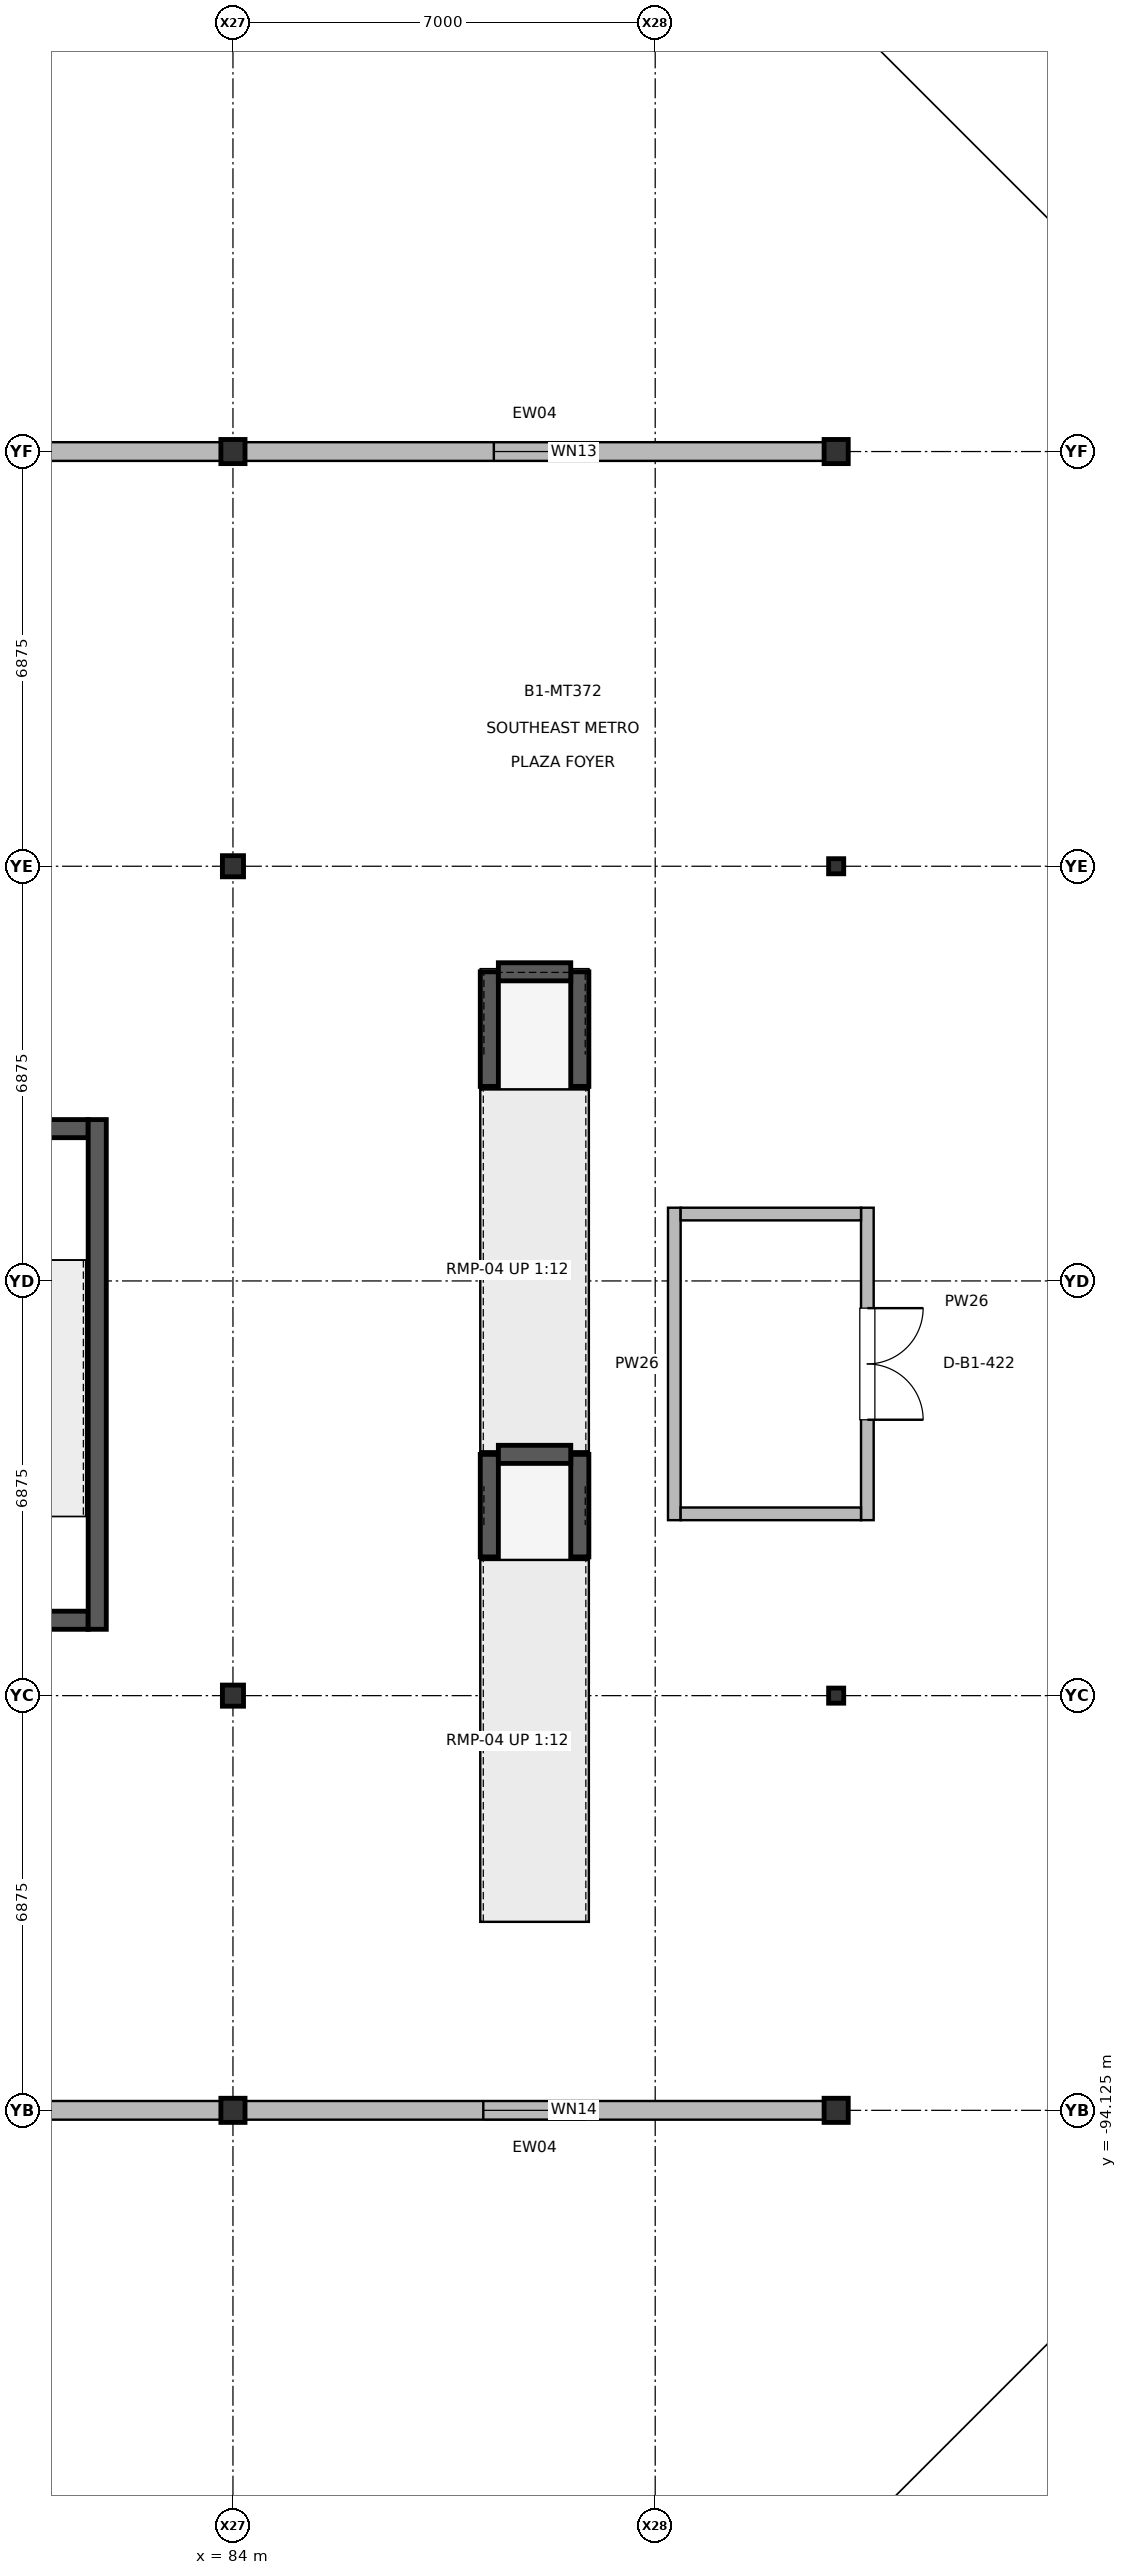
"""IFC4 building model, lengths in metres.
Left out: names, types, materials, properties, quantities, classifications, styles, units other than length and angle.
Written with IfcOpenShell. Run it as: python <this file> out.ifc"""

import sys

from ifc_helpers import new_model, si_unit, direction, frame, frame_2d, origin, origin_2d, place, context, subcontext, project, spatial, rectangle, i_section, extrude, element, fill, save


model = new_model("IFC4")
c1 = context("Model", 3, precision=1e-05, world=origin(), true_north=direction((0.0, 1.0)))
c2 = subcontext(c1, "Body", "Model", "MODEL_VIEW")
j1 = project(units=[si_unit("LENGTHUNIT", "METRE"), si_unit("PLANEANGLEUNIT", "RADIAN")], contexts=[c1])
p1 = place(None, origin())
s1 = spatial("IfcSite", under=j1, at=p1, CompositionType="ELEMENT")
p2 = place(p1, origin())
s2 = spatial("IfcBuilding", under=s1, at=p2, CompositionType="ELEMENT")
p3 = place(p2, frame((0.0, 0.0, -6.0)))
s3 = spatial("IfcBuildingStorey", under=s2, at=p3, CompositionType="ELEMENT", Elevation=-6.0)
p4 = place(p3, frame((84.0, -94.125, 0.0), z_axis=(0.0, 0.0, 1.0), x_axis=(1.0, 0.0, 0.0)))
e1 = element("IfcColumn", 1, at=p4, inside=s3, PredefinedType="COLUMN", context=c2, shape_type="SweptSolid", body=[
    extrude(i_section(OverallWidth=0.4, OverallDepth=0.4, WebThickness=0.013, FlangeThickness=0.021, at=origin_2d()), origin(), (0.0, 0.0, 1.0), 5.998),
])
for number, where, z_axis, x_axis in (
    (2, (84.0, -87.25, 0.0), (0.0, 0.0, 1.0), (1.0, 0.0, 0.0)),
    (3, (84.0, -73.5, 0.0), (0.0, 0.0, 1.0), (1.0, 0.0, 0.0)),
):
    element("IfcColumn", number, at=place(p3, frame(where, z_axis=z_axis, x_axis=x_axis)), inside=s3, PredefinedType="COLUMN", context=c2, shape_type="SweptSolid", body=[
        extrude(i_section(OverallWidth=0.35, OverallDepth=0.35, WebThickness=0.012, FlangeThickness=0.019, at=origin_2d()), origin(), (0.0, 0.0, 1.0), 5.998),
    ])
for number, where, z_axis, x_axis in (
    (4, (84.0, -66.625, 0.0), (0.0, 0.0, 1.0), (1.0, 0.0, 0.0)),
    (5, (94.0, -94.125, 0.0), (0.0, 0.0, 1.0), (1.0, 0.0, 0.0)),
):
    element("IfcColumn", number, at=place(p3, frame(where, z_axis=z_axis, x_axis=x_axis)), inside=s3, PredefinedType="COLUMN", context=c2, shape_type="SweptSolid", body=[
        extrude(i_section(OverallWidth=0.4, OverallDepth=0.4, WebThickness=0.013, FlangeThickness=0.021, at=origin_2d()), origin(), (0.0, 0.0, 1.0), 5.998),
    ])
for number, where, z_axis, x_axis in (
    (6, (94.0, -87.25, 0.0), (0.0, 0.0, 1.0), (1.0, 0.0, 0.0)),
    (7, (94.0, -73.5, 0.0), (0.0, 0.0, 1.0), (1.0, 0.0, 0.0)),
):
    element("IfcColumn", number, at=place(p3, frame(where, z_axis=z_axis, x_axis=x_axis)), inside=s3, PredefinedType="COLUMN", context=c2, shape_type="SweptSolid", body=[
        extrude(i_section(OverallWidth=0.25, OverallDepth=0.25, WebThickness=0.009, FlangeThickness=0.014, at=origin_2d()), origin(), (0.0, 0.0, 1.0), 5.998),
    ])
p5 = place(p3, frame((94.0, -66.625, 0.0), z_axis=(0.0, 0.0, 1.0), x_axis=(1.0, 0.0, 0.0)))
e8 = element("IfcColumn", 8, at=p5, inside=s3, PredefinedType="COLUMN", context=c2, shape_type="SweptSolid", body=[
    extrude(i_section(OverallWidth=0.4, OverallDepth=0.4, WebThickness=0.013, FlangeThickness=0.021, at=origin_2d()), origin(), (0.0, 0.0, 1.0), 5.998),
])
p6 = place(p3, frame((70.19, -66.625, 0.0), z_axis=(0.0, 0.0, 1.0), x_axis=(1.0, 0.0, 0.0)))
e9 = element("IfcWall", 9, at=p6, inside=s3, PredefinedType="SOLIDWALL", context=c2, shape_type="SweptSolid", body=[
    extrude(rectangle(XDim=13.62, YDim=0.31, at=frame_2d((6.81, 0.0))), origin(), (0.0, 0.0, 1.0), 4.655),
])
p7 = place(p6, frame((5.61, 0.0, 0.0)))
e10 = element("IfcOpeningElement", 10, at=p7, cuts=e9, PredefinedType="OPENING", context=c2, shape_type="SweptSolid", body=[
    extrude(rectangle(XDim=2.4, YDim=2.5, at=frame_2d((1.2, 1.25))), frame((0.0, 0.165, 0.0), z_axis=(0.0, -1.0, 0.0), x_axis=(1.0, 0.0, 0.0)), (0.0, 0.0, 1.0), 0.33),
])
p8 = place(p3, frame((83.81, -94.125, 0.0), z_axis=(0.0, 0.0, 1.0), x_axis=(-1.0, 0.0, 0.0)))
e11 = element("IfcWall", 11, at=p8, inside=s3, PredefinedType="SOLIDWALL", context=c2, shape_type="SweptSolid", body=[
    extrude(rectangle(XDim=13.62, YDim=0.31, at=frame_2d((6.81, 0.0))), origin(), (0.0, 0.0, 1.0), 4.655),
])
p9 = place(p8, frame((5.51, 0.0, 0.0)))
e12 = element("IfcOpeningElement", 12, at=p9, cuts=e11, PredefinedType="OPENING", context=c2, shape_type="SweptSolid", body=[
    extrude(rectangle(XDim=2.6, YDim=2.55, at=frame_2d((1.3, 1.275))), frame((0.0, 0.165, 0.0), z_axis=(0.0, -1.0, 0.0), x_axis=(1.0, 0.0, 0.0)), (0.0, 0.0, 1.0), 0.33),
])
p10 = place(p3, frame((84.19, -66.625, 0.0), z_axis=(0.0, 0.0, 1.0), x_axis=(1.0, 0.0, 0.0)))
e13 = element("IfcWall", 13, at=p10, inside=s3, PredefinedType="SOLIDWALL", context=c2, shape_type="SweptSolid", body=[
    extrude(rectangle(XDim=9.62, YDim=0.31, at=frame_2d((4.81, 0.0))), origin(), (0.0, 0.0, 1.0), 4.655),
])
p11 = place(p10, frame((4.135, 0.0, 1.0)))
e14 = element("IfcOpeningElement", 14, at=p11, cuts=e13, PredefinedType="OPENING", context=c2, shape_type="SweptSolid", body=[
    extrude(rectangle(XDim=1.35, YDim=1.75, at=frame_2d((0.675, 0.875))), frame((0.0, 0.165, 0.0), z_axis=(0.0, -1.0, 0.0), x_axis=(1.0, 0.0, 0.0)), (0.0, 0.0, 1.0), 0.33),
])
p12 = place(p3, frame((93.81, -94.125, 0.0), z_axis=(0.0, 0.0, 1.0), x_axis=(-1.0, 0.0, 0.0)))
e15 = element("IfcWall", 15, at=p12, inside=s3, PredefinedType="SOLIDWALL", context=c2, shape_type="SweptSolid", body=[
    extrude(rectangle(XDim=9.62, YDim=0.31, at=frame_2d((4.81, 0.0))), origin(), (0.0, 0.0, 1.0), 4.555),
])
p13 = place(p12, frame((3.96, 0.0, 1.0)))
e16 = element("IfcOpeningElement", 16, at=p13, cuts=e15, PredefinedType="OPENING", context=c2, shape_type="SweptSolid", body=[
    extrude(rectangle(XDim=1.7, YDim=1.85, at=frame_2d((0.85, 0.925))), frame((0.0, 0.165, 0.0), z_axis=(0.0, -1.0, 0.0), x_axis=(1.0, 0.0, 0.0)), (0.0, 0.0, 1.0), 0.33),
])
p14 = place(p3, frame((94.517, -79.161, 0.0), z_axis=(0.0, 0.0, 1.0), x_axis=(0.0, -1.0, 0.0)))
e17 = element("IfcWall", 17, at=p14, inside=s3, PredefinedType="PARTITIONING", context=c2, shape_type="SweptSolid", body=[
    extrude(rectangle(XDim=5.18, YDim=0.21, at=frame_2d((2.59, 0.0))), origin(), (0.0, 0.0, 1.0), 5.02),
])
p15 = place(p14, frame((1.665, 0.0, 0.0)))
e18 = element("IfcOpeningElement", 18, at=p15, cuts=e17, PredefinedType="OPENING", context=c2, shape_type="SweptSolid", body=[
    extrude(rectangle(XDim=1.85, YDim=2.4, at=frame_2d((0.925, 1.2))), frame((0.0, 0.115, 0.0), z_axis=(0.0, -1.0, 0.0), x_axis=(1.0, 0.0, 0.0)), (0.0, 0.0, 1.0), 0.23),
])
p16 = place(p3, frame((91.317, -84.341, 0.0), z_axis=(0.0, 0.0, 1.0), x_axis=(0.0, 1.0, 0.0)))
e19 = element("IfcWall", 19, at=p16, inside=s3, PredefinedType="PARTITIONING", context=c2, shape_type="SweptSolid", body=[
    extrude(rectangle(XDim=5.18, YDim=0.21, at=frame_2d((2.59, 0.0))), origin(), (0.0, 0.0, 1.0), 5.02),
])
for number, where, z_axis, x_axis in (
    (20, (91.422, -84.236, 0.0), (0.0, 0.0, 1.0), (1.0, 0.0, 0.0)),
    (21, (91.422, -79.266, 0.0), (0.0, 0.0, 1.0), (1.0, 0.0, 0.0)),
):
    element("IfcWall", number, at=place(p3, frame(where, z_axis=z_axis, x_axis=x_axis)), inside=s3, PredefinedType="PARTITIONING", context=c2, shape_type="SweptSolid", body=[
        extrude(rectangle(XDim=2.99, YDim=0.21, at=frame_2d((1.495, 0.0))), origin(), (0.0, 0.0, 1.0), 4.905),
    ])
p17 = place(p3, frame((77.4, -86.0, 0.0), z_axis=(0.0, 0.0, 1.0), x_axis=(1.0, 0.0, 0.0)))
e22 = element("IfcWall", 22, at=p17, inside=s3, PredefinedType="SHEAR", context=c2, shape_type="SweptSolid", body=[
    extrude(rectangle(XDim=4.2, YDim=0.3, at=frame_2d((2.1, 0.0))), origin(), (0.0, 0.0, 1.0), 5.78),
])
p18 = place(p17, frame((1.375, 0.0, 0.0)))
e23 = element("IfcOpeningElement", 23, at=p18, cuts=e22, PredefinedType="OPENING", context=c2, shape_type="SweptSolid", body=[
    extrude(rectangle(XDim=1.45, YDim=2.2, at=frame_2d((0.725, 1.1))), frame((0.0, 0.16, 0.0), z_axis=(0.0, -1.0, 0.0), x_axis=(1.0, 0.0, 0.0)), (0.0, 0.0, 1.0), 0.32),
])
p19 = place(p3, frame((77.4, -77.85, 0.0), z_axis=(0.0, 0.0, 1.0), x_axis=(1.0, 0.0, 0.0)))
e24 = element("IfcWall", 24, at=p19, inside=s3, PredefinedType="SHEAR", context=c2, shape_type="SweptSolid", body=[
    extrude(rectangle(XDim=4.2, YDim=0.3, at=frame_2d((2.1, 0.0))), origin(), (0.0, 0.0, 1.0), 5.78),
])
p20 = place(p3, frame((81.75, -86.15, 0.0), z_axis=(0.0, 0.0, 1.0), x_axis=(0.0, 1.0, 0.0)))
e25 = element("IfcWall", 25, at=p20, inside=s3, PredefinedType="SHEAR", context=c2, shape_type="SweptSolid", body=[
    extrude(rectangle(XDim=8.45, YDim=0.3, at=frame_2d((4.225, 0.0))), origin(), (0.0, 0.0, 1.0), 5.78),
])
for number, where, z_axis, x_axis in (
    (26, (88.25, -84.95, 0.0), (0.0, 0.0, 1.0), (0.0, 1.0, 0.0)),
    (27, (89.75, -84.95, 0.0), (0.0, 0.0, 1.0), (0.0, 1.0, 0.0)),
):
    element("IfcWall", number, at=place(p3, frame(where, z_axis=z_axis, x_axis=x_axis)), inside=s3, PredefinedType="SHEAR", context=c2, shape_type="SweptSolid", body=[
        extrude(rectangle(XDim=1.7, YDim=0.3, at=frame_2d((0.85, 0.0))), origin(), (0.0, 0.0, 1.0), 0.3),
    ])
p21 = place(p3, frame((88.4, -83.25, 0.0), z_axis=(0.0, 0.0, 1.0), x_axis=(1.0, 0.0, 0.0)))
e28 = element("IfcWall", 28, at=p21, inside=s3, PredefinedType="SHEAR", context=c2, shape_type="SweptSolid", body=[
    extrude(rectangle(XDim=1.2, YDim=0.3, at=frame_2d((0.6, 0.0))), origin(), (0.0, 0.0, 1.0), 0.3),
])
for number, where, z_axis, x_axis in (
    (29, (88.25, -77.15, 0.0), (0.0, 0.0, 1.0), (0.0, 1.0, 0.0)),
    (30, (89.75, -77.15, 0.0), (0.0, 0.0, 1.0), (0.0, 1.0, 0.0)),
):
    element("IfcWall", number, at=place(p3, frame(where, z_axis=z_axis, x_axis=x_axis)), inside=s3, PredefinedType="SHEAR", context=c2, shape_type="SweptSolid", body=[
        extrude(rectangle(XDim=1.9, YDim=0.3, at=frame_2d((0.95, 0.0))), origin(), (0.0, 0.0, 1.0), 0.8),
    ])
p22 = place(p3, frame((88.4, -75.25, 0.0), z_axis=(0.0, 0.0, 1.0), x_axis=(1.0, 0.0, 0.0)))
e31 = element("IfcWall", 31, at=p22, inside=s3, PredefinedType="SHEAR", context=c2, shape_type="SweptSolid", body=[
    extrude(rectangle(XDim=1.2, YDim=0.3, at=frame_2d((0.6, 0.0))), origin(), (0.0, 0.0, 1.0), 0.8),
])
p23 = place(p11, origin())
e32 = element("IfcWindow", 32, at=p23, inside=s3, PartitioningType="SINGLE_PANEL", PredefinedType="WINDOW", context=c2, shape_type="SweptSolid", body=[
    extrude(rectangle(XDim=1.35, YDim=1.75, at=frame_2d((0.675, 0.875))), frame((0.0, 0.03, 0.0), z_axis=(0.0, -1.0, 0.0), x_axis=(1.0, 0.0, 0.0)), (0.0, 0.0, 1.0), 0.06),
])
fill(e14, e32)
p24 = place(p13, origin())
e33 = element("IfcWindow", 33, at=p24, inside=s3, PartitioningType="SINGLE_PANEL", PredefinedType="WINDOW", context=c2, shape_type="SweptSolid", body=[
    extrude(rectangle(XDim=1.7, YDim=1.85, at=frame_2d((0.85, 0.925))), frame((0.0, 0.03, 0.0), z_axis=(0.0, -1.0, 0.0), x_axis=(1.0, 0.0, 0.0)), (0.0, 0.0, 1.0), 0.06),
])
fill(e16, e33)
p25 = place(p15, origin())
e34 = element("IfcDoor", 34, at=p25, inside=s3, OperationType="DOUBLE_DOOR_SINGLE_SWING", PredefinedType="DOOR", context=c2, shape_type="SweptSolid", body=[
    extrude(rectangle(XDim=1.85, YDim=2.4, at=frame_2d((0.925, 1.2))), frame((0.0, 0.025, 0.0), z_axis=(0.0, -1.0, 0.0), x_axis=(1.0, 0.0, 0.0)), (0.0, 0.0, 1.0), 0.05),
])
fill(e18, e34)
save(model, sys.argv[1])
